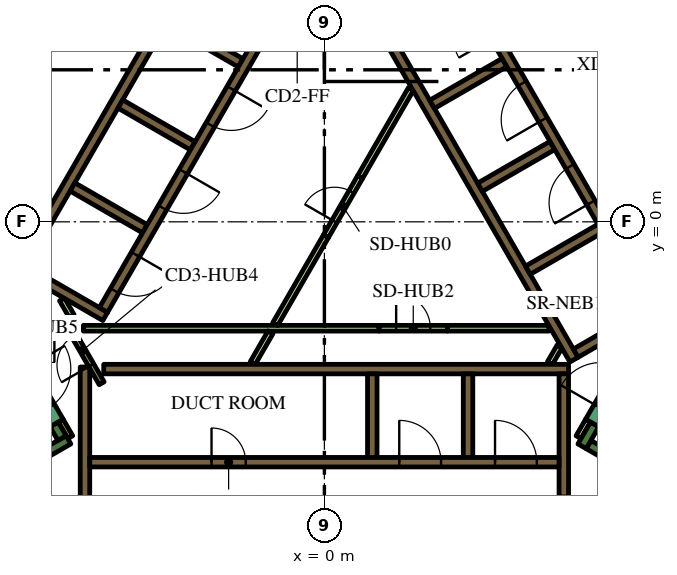
"""IFC4 building model, lengths in metres.
Left out: names, types, materials, properties, quantities, classifications, styles, units other than length and angle.
Written with IfcOpenShell. Run it as: python <this file> out.ifc"""

import sys

from ifc_helpers import new_model, si_unit, direction, frame, frame_2d, origin, place, context, subcontext, project, spatial, polyline, rectangle, outline, extrude, element, fill, save


model = new_model("IFC4")
c1 = context("Model", 3, precision=1e-05, world=origin(), true_north=direction((0.0, 1.0)))
c2 = subcontext(c1, "Body", "Model", "MODEL_VIEW")
j1 = project(units=[si_unit("LENGTHUNIT", "METRE"), si_unit("PLANEANGLEUNIT", "RADIAN")], contexts=[c1])
p1 = place(None, origin())
s1 = spatial("IfcSite", under=j1, at=p1, CompositionType="ELEMENT")
p2 = place(p1, origin())
s2 = spatial("IfcBuilding", under=s1, at=p2, CompositionType="ELEMENT")
p3 = place(p2, frame((0.0, 0.0, 292.2)))
s3 = spatial("IfcBuildingStorey", under=s2, at=p3, CompositionType="ELEMENT", Elevation=292.2)
p4 = place(p3, origin())
e1 = element("IfcWall", 1, at=p4, inside=s3, PredefinedType="SOLIDWALL", context=c2, shape_type="SweptSolid", body=[
    extrude(outline(polyline([(-15.502, -6.35), (-4.912, 11.992), (-4.393, 11.692), (-10.815, 0.569), (-10.84, 0.583), (-10.84, 0.583), (-10.84, 0.583), (-10.965, 0.367), (-10.965, 0.367), (-10.965, 0.367), (-10.94, 0.352), (-11.033, 0.191), (-14.809, -6.35), (-15.156, -6.95), (-15.502, -6.35)])), origin(), (0.0, 0.0, 1.0), 4.2),
])
p5 = place(p3, frame((12.84, -9.261, 0.0), z_axis=(0.0, 0.0, 1.0), x_axis=(-0.866013990052, 0.500019768644, 0.0)))
e2 = element("IfcWall", 2, at=p5, inside=s3, PredefinedType="SOLIDWALL", context=c2, shape_type="SweptSolid", body=[
    extrude(rectangle(XDim=6.8, YDim=0.25, at=frame_2d((3.4, 0.0))), origin(), (0.0, 0.0, 1.0), 4.2),
])
p6 = place(p3, frame((7.113, -5.33, 0.0), z_axis=(0.0, 0.0, 1.0), x_axis=(-0.499965889992, -0.866045096311, 0.0)))
e3 = element("IfcWall", 3, at=p6, inside=s3, PredefinedType="SOLIDWALL", context=c2, shape_type="SweptSolid", body=[
    extrude(rectangle(XDim=0.666, YDim=0.25, at=frame_2d((0.333, 0.0))), origin(), (0.0, 0.0, 1.0), 4.2),
])
p7 = place(p3, frame((-12.84, -9.261, 0.0), z_axis=(0.0, 0.0, 1.0), x_axis=(0.866016039709, 0.500016218704, 0.0)))
e4 = element("IfcWall", 4, at=p7, inside=s3, PredefinedType="SOLIDWALL", context=c2, shape_type="SweptSolid", body=[
    extrude(rectangle(XDim=7.05, YDim=0.25, at=frame_2d((3.525, 0.0))), origin(), (0.0, 0.0, 1.0), 4.2),
])
p8 = place(p3, frame((-6.905, -5.69, 0.0), z_axis=(0.0, 0.0, 1.0), x_axis=(-0.499993700073, 0.866029041019, 0.0)))
e5 = element("IfcWall", 5, at=p8, inside=s3, PredefinedType="SOLIDWALL", context=c2, shape_type="SweptSolid", body=[
    extrude(rectangle(XDim=0.416, YDim=0.25, at=frame_2d((0.208, 0.0))), origin(), (0.0, 0.0, 1.0), 4.2),
])
p9 = place(p3, frame((-5.806, -3.875, 0.0), z_axis=(0.0, 0.0, 1.0), x_axis=(1.0, 0.0, 0.0)))
e6 = element("IfcWall", 6, at=p9, inside=s3, PredefinedType="SOLIDWALL", context=c2, shape_type="SweptSolid", body=[
    extrude(rectangle(XDim=12.231, YDim=0.25, at=frame_2d((6.116, 0.0))), origin(), (0.0, 0.0, 1.0), 4.2),
])
p10 = place(p3, frame((6.3, -7.24, 0.0), z_axis=(0.0, 0.0, 1.0), x_axis=(0.0, 1.0, 0.0)))
e7 = element("IfcWall", 7, at=p10, inside=s3, PredefinedType="SOLIDWALL", context=c2, shape_type="SweptSolid", body=[
    extrude(rectangle(XDim=3.24, YDim=0.25, at=frame_2d((1.62, 0.0))), origin(), (0.0, 0.0, 1.0), 4.2),
])
for number, where, z_axis, x_axis in (
    (8, (3.78, -4.0, 0.0), (0.0, 0.0, 1.0), (0.0, -1.0, 0.0)),
    (9, (1.26, -4.0, 0.0), (0.0, 0.0, 1.0), (0.0, -1.0, 0.0)),
):
    element("IfcWall", number, at=place(p3, frame(where, z_axis=z_axis, x_axis=x_axis)), inside=s3, PredefinedType="SOLIDWALL", context=c2, shape_type="SweptSolid", body=[
        extrude(rectangle(XDim=2.2, YDim=0.25, at=frame_2d((1.1, 0.0))), origin(), (0.0, 0.0, 1.0), 4.2),
    ])
p11 = place(p3, frame((-6.3, -9.05, 0.0), z_axis=(0.0, 0.0, 1.0), x_axis=(0.0, 1.0, 0.0)))
e10 = element("IfcWall", 10, at=p11, inside=s3, PredefinedType="SOLIDWALL", context=c2, shape_type="SweptSolid", body=[
    extrude(rectangle(XDim=5.23, YDim=0.25, at=frame_2d((2.615, 0.0))), origin(), (0.0, 0.0, 1.0), 4.2),
])
e11 = element("IfcWall", 11, at=p4, inside=s3, PredefinedType="SOLIDWALL", context=c2, shape_type="SweptSolid", body=[
    extrude(outline(polyline([(0.332, 6.925), (0.335, 6.925), (0.335, 6.925), (0.335, 6.925), (0.335, 7.075), (0.335, 7.075), (0.335, 7.075), (0.245, 7.075), (0.035, 7.439), (0.252, 7.564), (0.377, 7.348), (1.512, 5.382), (1.637, 5.165), (2.221, 4.153), (2.771, 3.199), (2.896, 2.983), (3.138, 2.564), (4.031, 1.017), (4.156, 0.801), (5.292, -1.165), (5.417, -1.382), (6.073, -2.519), (6.552, -3.348), (6.677, -3.564), (6.46, -3.689), (0.332, 6.925)])), origin(), (0.0, 0.0, 1.0), 4.2),
])
for number, where, z_axis, x_axis in (
    (12, (2.834, 3.091, 0.0), (0.0, 0.0, 1.0), (0.866, 0.5, 0.0)),
    (13, (4.094, 0.909, 0.0), (0.0, 0.0, 1.0), (0.866, 0.5, 0.0)),
    (14, (5.354, -1.274, 0.0), (0.0, 0.0, 1.0), (0.866, 0.5, 0.0)),
):
    element("IfcWall", number, at=place(p3, frame(where, z_axis=z_axis, x_axis=x_axis)), inside=s3, PredefinedType="SOLIDWALL", context=c2, shape_type="SweptSolid", body=[
        extrude(rectangle(XDim=2.2, YDim=0.25, at=frame_2d((1.1, 0.0))), origin(), (0.0, 0.0, 1.0), 4.2),
    ])
p12 = place(p3, frame((11.507, -0.631, 0.0), z_axis=(0.0, 0.0, 1.0), x_axis=(-0.866011447264, -0.500024172624, 0.0)))
e15 = element("IfcWall", 15, at=p12, inside=s3, PredefinedType="SOLIDWALL", context=c2, shape_type="SweptSolid", body=[
    extrude(rectangle(XDim=5.65, YDim=0.25, at=frame_2d((2.825, 0.0))), origin(), (0.0, 0.0, 1.0), 4.2),
])
p13 = place(p3, frame((-8.06, -1.311, 0.0), z_axis=(0.0, 0.0, 1.0), x_axis=(0.50000273126, 0.866023826885, 0.0)))
e16 = element("IfcWall", 16, at=p13, inside=s3, PredefinedType="SOLIDWALL", context=c2, shape_type="SweptSolid", body=[
    extrude(rectangle(XDim=10.33, YDim=0.25, at=frame_2d((5.165, 0.0))), origin(), (0.0, 0.0, 1.0), 4.2),
])
for number, where, z_axis, x_axis in (
    (17, (-2.204, 4.182, 0.0), (0.0, 0.0, 1.0), (-0.866, 0.5, 0.0)),
    (18, (-5.369, 3.1, 0.0), (0.0, 0.0, 1.0), (0.866, -0.5, 0.0)),
    (19, (-4.724, -0.182, 0.0), (0.0, 0.0, 1.0), (-0.866, 0.5, 0.0)),
):
    element("IfcWall", number, at=place(p3, frame(where, z_axis=z_axis, x_axis=x_axis)), inside=s3, PredefinedType="SOLIDWALL", context=c2, shape_type="SweptSolid", body=[
        extrude(rectangle(XDim=2.2, YDim=0.25, at=frame_2d((1.1, 0.0))), origin(), (0.0, 0.0, 1.0), 4.2),
    ])
p14 = place(p3, frame((-7.889, -1.265, 0.0), z_axis=(0.0, 0.0, 1.0), x_axis=(0.866057815567, -0.499943856944, 0.0)))
e20 = element("IfcWall", 20, at=p14, inside=s3, PredefinedType="SOLIDWALL", context=c2, shape_type="SweptSolid", body=[
    extrude(rectangle(XDim=2.45, YDim=0.25, at=frame_2d((1.225, 0.0))), origin(), (0.0, 0.0, 1.0), 4.2),
])
p15 = place(p3, frame((0.941, 1.179, 0.0), z_axis=(0.0, 0.0, 1.0), x_axis=(0.499962406319, 0.866047107418, 0.0)))
e21 = element("IfcWall", 21, at=p15, inside=s3, PredefinedType="PARTITIONING", context=c2, shape_type="SweptSolid", body=[
    extrude(rectangle(XDim=2.672, YDim=0.15, at=frame_2d((1.336, 0.0))), origin(), (0.0, 0.0, 1.0), 3.55),
])
p16 = place(p3, frame((1.438, -2.8, 0.0), z_axis=(0.0, 0.0, 1.0), x_axis=(-1.0, 0.0, 0.0)))
e22 = element("IfcWall", 22, at=p16, inside=s3, PredefinedType="PARTITIONING", context=c2, shape_type="SweptSolid", body=[
    extrude(rectangle(XDim=7.781, YDim=0.15, at=frame_2d((3.891, 0.0))), origin(), (0.0, 0.0, 1.0), 3.55),
])
p17 = place(p3, frame((-1.418, -2.907, 0.0), z_axis=(0.0, 0.0, 1.0), x_axis=(-0.499978056798, -0.866038072327, 0.0)))
e23 = element("IfcWall", 23, at=p17, inside=s3, PredefinedType="PARTITIONING", context=c2, shape_type="SweptSolid", body=[
    extrude(rectangle(XDim=0.937, YDim=0.15, at=frame_2d((0.469, 0.0))), origin(), (0.0, 0.0, 1.0), 3.55),
])
for number, where, z_axis, x_axis in (
    (24, (-1.295, -2.693, 0.0), (0.0, 0.0, 1.0), (0.5, 0.866, 0.0)),
    (25, (3.238, -2.8, 0.0), (0.0, 0.0, 1.0), (1.0, 0.0, 0.0)),
):
    element("IfcWall", number, at=place(p3, frame(where, z_axis=z_axis, x_axis=x_axis)), inside=s3, PredefinedType="PARTITIONING", context=c2, shape_type="SweptSolid", body=[
        extrude(rectangle(XDim=2.672, YDim=0.15, at=frame_2d((1.336, 0.0))), origin(), (0.0, 0.0, 1.0), 3.55),
    ])
p18 = place(p3, frame((-6.653, -2.477, 0.0), z_axis=(0.0, 0.0, 1.0), x_axis=(-0.500002592159, 0.866023907196, 0.0)))
e26 = element("IfcWall", 26, at=p18, inside=s3, PredefinedType="PARTITIONING", context=c2, shape_type="SweptSolid", body=[
    extrude(rectangle(XDim=0.503, YDim=0.15, at=frame_2d((0.251, 0.0))), origin(), (0.0, 0.0, 1.0), 3.55),
])
p19 = place(p3, frame((-6.94, -5.23, 0.0), z_axis=(0.0, 0.0, 1.0), x_axis=(0.499834152157, -0.86612113491, 0.0)))
e27 = element("IfcWall", 27, at=p19, inside=s3, PredefinedType="PARTITIONING", context=c2, shape_type="SweptSolid", body=[
    extrude(rectangle(XDim=0.505, YDim=0.15, at=frame_2d((0.252, 0.0))), origin(), (0.0, 0.0, 1.0), 4.2),
])
p20 = place(p3, frame((6.688, -5.667, 0.0), z_axis=(0.0, 0.0, 1.0), x_axis=(0.499834152157, 0.86612113491, 0.0)))
e28 = element("IfcWall", 28, at=p20, inside=s3, PredefinedType="PARTITIONING", context=c2, shape_type="SweptSolid", body=[
    extrude(rectangle(XDim=0.505, YDim=0.15, at=frame_2d((0.252, 0.0))), origin(), (0.0, 0.0, 1.0), 3.55),
])
p21 = place(p3, frame((5.936, -3.718, 0.0), z_axis=(0.0, 0.0, 1.0), x_axis=(0.499890179513, 0.866088799389, 0.0)))
e29 = element("IfcWall", 29, at=p21, inside=s3, PredefinedType="PARTITIONING", context=c2, shape_type="SweptSolid", body=[
    extrude(rectangle(XDim=0.504, YDim=0.15, at=frame_2d((0.252, 0.0))), origin(), (0.0, 0.0, 1.0), 3.55),
])
p22 = place(p3, frame((-6.175, -6.325, 0.0), z_axis=(0.0, 0.0, 1.0), x_axis=(1.0, 0.0, 0.0)))
e30 = element("IfcWall", 30, at=p22, inside=s3, PredefinedType="SOLIDWALL", context=c2, shape_type="SweptSolid", body=[
    extrude(rectangle(XDim=12.35, YDim=0.25, at=frame_2d((6.175, 0.0))), origin(), (0.0, 0.0, 1.0), 4.2),
])
p23 = place(p22, frame((3.205, 0.0, 0.0)))
e31 = element("IfcOpeningElement", 31, at=p23, cuts=e30, PredefinedType="OPENING", context=c2, shape_type="SweptSolid", body=[
    extrude(rectangle(XDim=0.9, YDim=2.1, at=frame_2d((0.45, 1.05))), frame((0.0, 0.135, 0.0), z_axis=(0.0, -1.0, 0.0), x_axis=(1.0, 0.0, 0.0)), (0.0, 0.0, 1.0), 0.27),
])
p24 = place(p22, frame((8.145, 0.0, 0.0)))
e32 = element("IfcOpeningElement", 32, at=p24, cuts=e30, PredefinedType="OPENING", context=c2, shape_type="SweptSolid", body=[
    extrude(rectangle(XDim=1.1, YDim=2.1, at=frame_2d((0.55, 1.05))), frame((0.0, 0.135, 0.0), z_axis=(0.0, -1.0, 0.0), x_axis=(1.0, 0.0, 0.0)), (0.0, 0.0, 1.0), 0.27),
])
p25 = place(p22, frame((10.665, 0.0, 0.0)))
e33 = element("IfcOpeningElement", 33, at=p25, cuts=e30, PredefinedType="OPENING", context=c2, shape_type="SweptSolid", body=[
    extrude(rectangle(XDim=1.1, YDim=2.1, at=frame_2d((0.55, 1.05))), frame((0.0, 0.135, 0.0), z_axis=(0.0, -1.0, 0.0), x_axis=(1.0, 0.0, 0.0)), (0.0, 0.0, 1.0), 0.27),
])
p26 = place(p3, frame((8.565, -2.185, 0.0), z_axis=(0.0, 0.0, 1.0), x_axis=(-0.499997954832, 0.866026584559, 0.0)))
e34 = element("IfcWall", 34, at=p26, inside=s3, PredefinedType="SOLIDWALL", context=c2, shape_type="SweptSolid", body=[
    extrude(rectangle(XDim=12.35, YDim=0.25, at=frame_2d((6.175, 0.0))), origin(), (0.0, 0.0, 1.0), 4.2),
])
p27 = place(p26, frame((0.685, 0.0, 0.0)))
e35 = element("IfcOpeningElement", 35, at=p27, cuts=e34, PredefinedType="OPENING", context=c2, shape_type="SweptSolid", body=[
    extrude(rectangle(XDim=0.9, YDim=2.1, at=frame_2d((0.45, 1.05))), frame((0.0, 0.135, 0.0), z_axis=(0.0, -1.0, 0.0), x_axis=(1.0, 0.0, 0.0)), (0.0, 0.0, 1.0), 0.27),
])
p28 = place(p26, frame((3.105, 0.0, 0.0)))
e36 = element("IfcOpeningElement", 36, at=p28, cuts=e34, PredefinedType="OPENING", context=c2, shape_type="SweptSolid", body=[
    extrude(rectangle(XDim=1.1, YDim=2.1, at=frame_2d((0.55, 1.05))), frame((0.0, 0.135, 0.0), z_axis=(0.0, -1.0, 0.0), x_axis=(1.0, 0.0, 0.0)), (0.0, 0.0, 1.0), 0.27),
])
p29 = place(p26, frame((5.625, 0.0, 0.0)))
e37 = element("IfcOpeningElement", 37, at=p29, cuts=e34, PredefinedType="OPENING", context=c2, shape_type="SweptSolid", body=[
    extrude(rectangle(XDim=1.1, YDim=2.1, at=frame_2d((0.55, 1.05))), frame((0.0, 0.135, 0.0), z_axis=(0.0, -1.0, 0.0), x_axis=(1.0, 0.0, 0.0)), (0.0, 0.0, 1.0), 0.27),
])
p30 = place(p26, frame((8.145, 0.0, 0.0)))
e38 = element("IfcOpeningElement", 38, at=p30, cuts=e34, PredefinedType="OPENING", context=c2, shape_type="SweptSolid", body=[
    extrude(rectangle(XDim=1.1, YDim=2.1, at=frame_2d((0.55, 1.05))), frame((0.0, 0.135, 0.0), z_axis=(0.0, -1.0, 0.0), x_axis=(1.0, 0.0, 0.0)), (0.0, 0.0, 1.0), 0.27),
])
p31 = place(p26, frame((10.665, 0.0, 0.0)))
e39 = element("IfcOpeningElement", 39, at=p31, cuts=e34, PredefinedType="OPENING", context=c2, shape_type="SweptSolid", body=[
    extrude(rectangle(XDim=1.1, YDim=2.1, at=frame_2d((0.55, 1.05))), frame((0.0, 0.135, 0.0), z_axis=(0.0, -1.0, 0.0), x_axis=(1.0, 0.0, 0.0)), (0.0, 0.0, 1.0), 0.27),
])
p32 = place(p3, frame((-0.898, 6.194, 0.0), z_axis=(0.0, 0.0, 1.0), x_axis=(-0.499996202215, -0.866027596426, 0.0)))
e40 = element("IfcWall", 40, at=p32, inside=s3, PredefinedType="SOLIDWALL", context=c2, shape_type="SweptSolid", body=[
    extrude(rectangle(XDim=9.83, YDim=0.25, at=frame_2d((4.915, 0.0))), origin(), (0.0, 0.0, 1.0), 4.2),
])
p33 = place(p32, frame((0.585, 0.0, 0.0)))
e41 = element("IfcOpeningElement", 41, at=p33, cuts=e40, PredefinedType="OPENING", context=c2, shape_type="SweptSolid", body=[
    extrude(rectangle(XDim=1.1, YDim=2.1, at=frame_2d((0.55, 1.05))), frame((0.0, 0.135, 0.0), z_axis=(0.0, -1.0, 0.0), x_axis=(1.0, 0.0, 0.0)), (0.0, 0.0, 1.0), 0.27),
])
p34 = place(p32, frame((3.105, 0.0, 0.0)))
e42 = element("IfcOpeningElement", 42, at=p34, cuts=e40, PredefinedType="OPENING", context=c2, shape_type="SweptSolid", body=[
    extrude(rectangle(XDim=1.1, YDim=2.1, at=frame_2d((0.55, 1.05))), frame((0.0, 0.135, 0.0), z_axis=(0.0, -1.0, 0.0), x_axis=(1.0, 0.0, 0.0)), (0.0, 0.0, 1.0), 0.27),
])
p35 = place(p32, frame((5.625, 0.0, 0.0)))
e43 = element("IfcOpeningElement", 43, at=p35, cuts=e40, PredefinedType="OPENING", context=c2, shape_type="SweptSolid", body=[
    extrude(rectangle(XDim=1.1, YDim=2.1, at=frame_2d((0.55, 1.05))), frame((0.0, 0.135, 0.0), z_axis=(0.0, -1.0, 0.0), x_axis=(1.0, 0.0, 0.0)), (0.0, 0.0, 1.0), 0.27),
])
p36 = place(p32, frame((8.145, 0.0, 0.0)))
e44 = element("IfcOpeningElement", 44, at=p36, cuts=e40, PredefinedType="OPENING", context=c2, shape_type="SweptSolid", body=[
    extrude(rectangle(XDim=1.1, YDim=2.1, at=frame_2d((0.55, 1.05))), frame((0.0, 0.135, 0.0), z_axis=(0.0, -1.0, 0.0), x_axis=(1.0, 0.0, 0.0)), (0.0, 0.0, 1.0), 0.27),
])
p37 = place(p3, frame((7.048, -5.292, 0.0), z_axis=(0.0, 0.0, 1.0), x_axis=(0.49994051562, 0.866059744384, 0.0)))
e45 = element("IfcWall", 45, at=p37, inside=s3, PredefinedType="SOLIDWALL", context=c2, shape_type="SweptSolid", body=[
    extrude(rectangle(XDim=2.1, YDim=0.4, at=frame_2d((1.05, 0.0))), origin(), (0.0, 0.0, 1.0), 4.2),
])
p38 = place(p37, frame((0.45, 0.0, 0.0)))
e46 = element("IfcOpeningElement", 46, at=p38, cuts=e45, PredefinedType="OPENING", context=c2, shape_type="SweptSolid", body=[
    extrude(rectangle(XDim=1.2, YDim=2.1, at=frame_2d((0.6, 1.05))), frame((0.0, 0.21, 0.0), z_axis=(0.0, -1.0, 0.0), x_axis=(1.0, 0.0, 0.0)), (0.0, 0.0, 1.0), 0.42),
])
p39 = place(p3, frame((-8.098, -3.474, 0.0), z_axis=(0.0, 0.0, 1.0), x_axis=(0.49994051562, -0.866059744384, 0.0)))
e47 = element("IfcWall", 47, at=p39, inside=s3, PredefinedType="SOLIDWALL", context=c2, shape_type="SweptSolid", body=[
    extrude(rectangle(XDim=2.1, YDim=0.4, at=frame_2d((1.05, 0.0))), origin(), (0.0, 0.0, 1.0), 4.2),
])
p40 = place(p39, frame((0.45, 0.0, 0.0)))
e48 = element("IfcOpeningElement", 48, at=p40, cuts=e47, PredefinedType="OPENING", context=c2, shape_type="SweptSolid", body=[
    extrude(rectangle(XDim=1.2, YDim=2.1, at=frame_2d((0.6, 1.05))), frame((0.0, 0.21, 0.0), z_axis=(0.0, -1.0, 0.0), x_axis=(1.0, 0.0, 0.0)), (0.0, 0.0, 1.0), 0.42),
])
p41 = place(p3, frame((-5.861, -4.248, 0.0), z_axis=(0.0, 0.0, 1.0), x_axis=(-0.500043646338, 0.866000203093, 0.0)))
e49 = element("IfcWall", 49, at=p41, inside=s3, PredefinedType="PARTITIONING", context=c2, shape_type="SweptSolid", body=[
    extrude(rectangle(XDim=1.93, YDim=0.15, at=frame_2d((0.965, 0.0))), origin(), (0.0, 0.0, 1.0), 4.2),
])
p42 = place(p41, frame((0.55, 0.0, 0.0)))
e50 = element("IfcOpeningElement", 50, at=p42, cuts=e49, PredefinedType="OPENING", context=c2, shape_type="SweptSolid", body=[
    extrude(rectangle(XDim=0.9, YDim=2.1, at=frame_2d((0.45, 1.05))), frame((0.0, 0.085, 0.0), z_axis=(0.0, -1.0, 0.0), x_axis=(1.0, 0.0, 0.0)), (0.0, 0.0, 1.0), 0.17),
])
p43 = place(p3, frame((0.041, -0.379, 0.0), z_axis=(0.0, 0.0, 1.0), x_axis=(0.499961193289, 0.866047807691, 0.0)))
e51 = element("IfcWall", 51, at=p43, inside=s3, PredefinedType="PARTITIONING", context=c2, shape_type="SweptSolid", body=[
    extrude(rectangle(XDim=1.8, YDim=0.15, at=frame_2d((0.9, 0.0))), origin(), (0.0, 0.0, 1.0), 3.55),
])
p44 = place(p43, frame((0.45, 0.0, 0.0)))
e52 = element("IfcOpeningElement", 52, at=p44, cuts=e51, PredefinedType="OPENING", context=c2, shape_type="SweptSolid", body=[
    extrude(rectangle(XDim=0.9, YDim=2.1, at=frame_2d((0.45, 1.05))), frame((0.0, 0.085, 0.0), z_axis=(0.0, -1.0, 0.0), x_axis=(1.0, 0.0, 0.0)), (0.0, 0.0, 1.0), 0.17),
])
p45 = place(p3, frame((1.438, -2.8, 0.0), z_axis=(0.0, 0.0, 1.0), x_axis=(1.0, 0.0, 0.0)))
e53 = element("IfcWall", 53, at=p45, inside=s3, PredefinedType="PARTITIONING", context=c2, shape_type="SweptSolid", body=[
    extrude(rectangle(XDim=1.8, YDim=0.15, at=frame_2d((0.9, 0.0))), origin(), (0.0, 0.0, 1.0), 3.55),
])
p46 = place(p45, frame((0.45, 0.0, 0.0)))
e54 = element("IfcOpeningElement", 54, at=p46, cuts=e53, PredefinedType="OPENING", context=c2, shape_type="SweptSolid", body=[
    extrude(rectangle(XDim=0.9, YDim=2.1, at=frame_2d((0.45, 1.05))), frame((0.0, 0.085, 0.0), z_axis=(0.0, -1.0, 0.0), x_axis=(1.0, 0.0, 0.0)), (0.0, 0.0, 1.0), 0.17),
])
p47 = place(p3, frame((-6.655, -2.8, 0.0), z_axis=(0.0, 0.0, 1.0), x_axis=(-1.0, 0.0, 0.0)))
e55 = element("IfcWall", 55, at=p47, inside=s3, PredefinedType="PARTITIONING", context=c2, shape_type="SweptSolid", body=[
    extrude(rectangle(XDim=1.8, YDim=0.15, at=frame_2d((0.9, 0.0))), origin(), (0.0, 0.0, 1.0), 3.55),
])
p48 = place(p47, frame((0.45, 0.0, 0.0)))
e56 = element("IfcOpeningElement", 56, at=p48, cuts=e55, PredefinedType="OPENING", context=c2, shape_type="SweptSolid", body=[
    extrude(rectangle(XDim=0.9, YDim=2.1, at=frame_2d((0.45, 1.05))), frame((0.0, 0.085, 0.0), z_axis=(0.0, -1.0, 0.0), x_axis=(1.0, 0.0, 0.0)), (0.0, 0.0, 1.0), 0.17),
])
p49 = place(p23, origin())
e57 = element("IfcDoor", 57, at=p49, inside=s3, OperationType="SINGLE_SWING_LEFT", PredefinedType="DOOR", context=c2, shape_type="SweptSolid", body=[
    extrude(rectangle(XDim=0.9, YDim=2.1, at=frame_2d((0.45, 1.05))), frame((0.0, 0.025, 0.0), z_axis=(0.0, -1.0, 0.0), x_axis=(1.0, 0.0, 0.0)), (0.0, 0.0, 1.0), 0.05),
])
fill(e31, e57)
p50 = place(p24, origin())
e58 = element("IfcDoor", 58, at=p50, inside=s3, OperationType="DOUBLE_DOOR_SLIDING", PredefinedType="DOOR", context=c2, shape_type="SweptSolid", body=[
    extrude(rectangle(XDim=1.1, YDim=2.1, at=frame_2d((0.55, 1.05))), frame((0.0, 0.025, 0.0), z_axis=(0.0, -1.0, 0.0), x_axis=(1.0, 0.0, 0.0)), (0.0, 0.0, 1.0), 0.05),
])
fill(e32, e58)
p51 = place(p25, origin())
e59 = element("IfcDoor", 59, at=p51, inside=s3, OperationType="DOUBLE_DOOR_SLIDING", PredefinedType="DOOR", context=c2, shape_type="SweptSolid", body=[
    extrude(rectangle(XDim=1.1, YDim=2.1, at=frame_2d((0.55, 1.05))), frame((0.0, 0.025, 0.0), z_axis=(0.0, -1.0, 0.0), x_axis=(1.0, 0.0, 0.0)), (0.0, 0.0, 1.0), 0.05),
])
fill(e33, e59)
p52 = place(p28, origin())
e60 = element("IfcDoor", 60, at=p52, inside=s3, OperationType="DOUBLE_DOOR_SLIDING", PredefinedType="DOOR", context=c2, shape_type="SweptSolid", body=[
    extrude(rectangle(XDim=1.1, YDim=2.1, at=frame_2d((0.55, 1.05))), frame((0.0, 0.025, 0.0), z_axis=(0.0, -1.0, 0.0), x_axis=(1.0, 0.0, 0.0)), (0.0, 0.0, 1.0), 0.05),
])
fill(e36, e60)
p53 = place(p29, origin())
e61 = element("IfcDoor", 61, at=p53, inside=s3, OperationType="DOUBLE_DOOR_SLIDING", PredefinedType="DOOR", context=c2, shape_type="SweptSolid", body=[
    extrude(rectangle(XDim=1.1, YDim=2.1, at=frame_2d((0.55, 1.05))), frame((0.0, 0.025, 0.0), z_axis=(0.0, -1.0, 0.0), x_axis=(1.0, 0.0, 0.0)), (0.0, 0.0, 1.0), 0.05),
])
fill(e37, e61)
p54 = place(p34, origin())
e62 = element("IfcDoor", 62, at=p54, inside=s3, OperationType="DOUBLE_DOOR_SLIDING", PredefinedType="DOOR", context=c2, shape_type="SweptSolid", body=[
    extrude(rectangle(XDim=1.1, YDim=2.1, at=frame_2d((0.55, 1.05))), frame((0.0, 0.025, 0.0), z_axis=(0.0, -1.0, 0.0), x_axis=(1.0, 0.0, 0.0)), (0.0, 0.0, 1.0), 0.05),
])
fill(e42, e62)
p55 = place(p35, origin())
e63 = element("IfcDoor", 63, at=p55, inside=s3, OperationType="DOUBLE_DOOR_SLIDING", PredefinedType="DOOR", context=c2, shape_type="SweptSolid", body=[
    extrude(rectangle(XDim=1.1, YDim=2.1, at=frame_2d((0.55, 1.05))), frame((0.0, 0.025, 0.0), z_axis=(0.0, -1.0, 0.0), x_axis=(1.0, 0.0, 0.0)), (0.0, 0.0, 1.0), 0.05),
])
fill(e43, e63)
p56 = place(p36, origin())
e64 = element("IfcDoor", 64, at=p56, inside=s3, OperationType="DOUBLE_DOOR_SLIDING", PredefinedType="DOOR", context=c2, shape_type="SweptSolid", body=[
    extrude(rectangle(XDim=1.1, YDim=2.1, at=frame_2d((0.55, 1.05))), frame((0.0, 0.025, 0.0), z_axis=(0.0, -1.0, 0.0), x_axis=(1.0, 0.0, 0.0)), (0.0, 0.0, 1.0), 0.05),
])
fill(e44, e64)
p57 = place(p42, origin())
e65 = element("IfcDoor", 65, at=p57, inside=s3, OperationType="SINGLE_SWING_LEFT", PredefinedType="DOOR", context=c2, shape_type="SweptSolid", body=[
    extrude(rectangle(XDim=0.9, YDim=2.1, at=frame_2d((0.45, 1.05))), frame((0.0, 0.025, 0.0), z_axis=(0.0, -1.0, 0.0), x_axis=(1.0, 0.0, 0.0)), (0.0, 0.0, 1.0), 0.05),
])
fill(e50, e65)
p58 = place(p44, origin())
e66 = element("IfcDoor", 66, at=p58, inside=s3, OperationType="SINGLE_SWING_LEFT", PredefinedType="DOOR", context=c2, shape_type="SweptSolid", body=[
    extrude(rectangle(XDim=0.9, YDim=2.1, at=frame_2d((0.45, 1.05))), frame((0.0, 0.025, 0.0), z_axis=(0.0, -1.0, 0.0), x_axis=(1.0, 0.0, 0.0)), (0.0, 0.0, 1.0), 0.05),
])
fill(e52, e66)
p59 = place(p46, origin())
e67 = element("IfcDoor", 67, at=p59, inside=s3, OperationType="SINGLE_SWING_LEFT", PredefinedType="DOOR", context=c2, shape_type="SweptSolid", body=[
    extrude(rectangle(XDim=0.9, YDim=2.1, at=frame_2d((0.45, 1.05))), frame((0.0, 0.025, 0.0), z_axis=(0.0, -1.0, 0.0), x_axis=(1.0, 0.0, 0.0)), (0.0, 0.0, 1.0), 0.05),
])
fill(e54, e67)
p60 = place(p48, origin())
e68 = element("IfcDoor", 68, at=p60, inside=s3, OperationType="SINGLE_SWING_LEFT", PredefinedType="DOOR", context=c2, shape_type="SweptSolid", body=[
    extrude(rectangle(XDim=0.9, YDim=2.1, at=frame_2d((0.45, 1.05))), frame((0.0, 0.025, 0.0), z_axis=(0.0, -1.0, 0.0), x_axis=(1.0, 0.0, 0.0)), (0.0, 0.0, 1.0), 0.05),
])
fill(e56, e68)
save(model, sys.argv[1])
